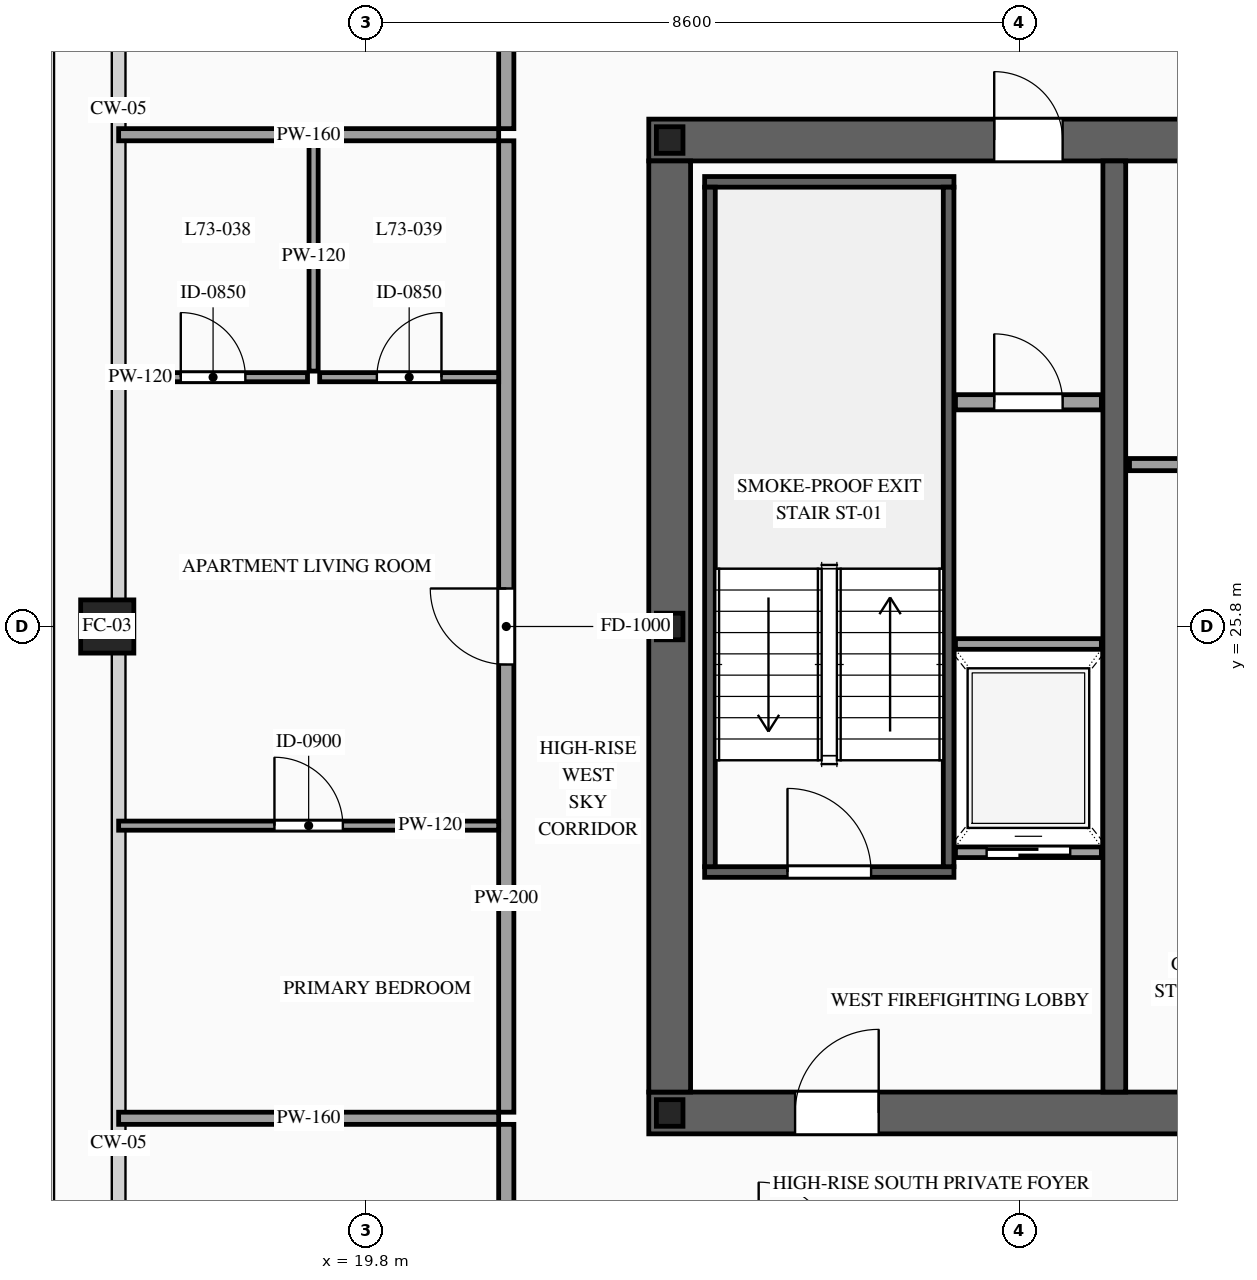
"""IFC4 building model, lengths in metres.
Left out: names, types, materials, properties, quantities, classifications, styles, units other than length and angle.
Written with IfcOpenShell. Run it as: python <this file> out.ifc"""

import sys

from ifc_helpers import new_model, si_unit, direction, frame, frame_2d, origin, origin_2d, place, context, subcontext, project, spatial, rectangle, hollow_rectangle, i_section, extrude, source, transform, mapped, element, fill, save


model = new_model("IFC4")
c1 = context("Model", 3, precision=1e-05, world=origin(), true_north=direction((0.0, 1.0)))
c2 = subcontext(c1, "Body", "Model", "MODEL_VIEW")
j1 = project(units=[si_unit("LENGTHUNIT", "METRE"), si_unit("PLANEANGLEUNIT", "RADIAN")], contexts=[c1])
p1 = place(None, origin())
s1 = spatial("IfcSite", under=j1, at=p1, CompositionType="ELEMENT")
p2 = place(p1, origin())
s2 = spatial("IfcBuilding", under=s1, at=p2, CompositionType="ELEMENT")
p3 = place(p2, frame((0.0, 0.0, 275.1)))
s3 = spatial("IfcBuildingStorey", under=s2, at=p3, CompositionType="ELEMENT", Elevation=275.1)
p4 = place(p3, frame((23.525, 19.4, 0.0), z_axis=(0.0, 0.0, 1.0), x_axis=(1.0, 0.0, 0.0)))
e1 = element("IfcWall", 1, at=p4, inside=s3, PredefinedType="SHEAR", context=c2, shape_type="SweptSolid", body=[
    extrude(rectangle(XDim=26.95, YDim=0.55, at=frame_2d((13.475, 0.0))), origin(), (0.0, 0.0, 1.0), 3.5),
])
p5 = place(p4, frame((1.925, 0.0, 0.0)))
e2 = element("IfcOpeningElement", 2, at=p5, cuts=e1, PredefinedType="OPENING", context=c2, shape_type="SweptSolid", body=[
    extrude(rectangle(XDim=1.1, YDim=2.2, at=frame_2d((0.55, 1.1))), frame((0.0, 0.29, 0.0), z_axis=(0.0, -1.0, 0.0), x_axis=(1.0, 0.0, 0.0)), (0.0, 0.0, 1.0), 0.58),
])
p6 = place(p4, frame((9.825, 0.0, 0.0)))
e3 = element("IfcOpeningElement", 3, at=p6, cuts=e1, PredefinedType="OPENING", context=c2, shape_type="SweptSolid", body=[
    extrude(rectangle(XDim=1.1, YDim=2.2, at=frame_2d((0.55, 1.1))), frame((0.0, 0.29, 0.0), z_axis=(0.0, -1.0, 0.0), x_axis=(1.0, 0.0, 0.0)), (0.0, 0.0, 1.0), 0.58),
])
p7 = place(p4, frame((23.025, 0.0, 0.0)))
e4 = element("IfcOpeningElement", 4, at=p7, cuts=e1, PredefinedType="OPENING", context=c2, shape_type="SweptSolid", body=[
    extrude(rectangle(XDim=1.1, YDim=2.2, at=frame_2d((0.55, 1.1))), frame((0.0, 0.29, 0.0), z_axis=(0.0, -1.0, 0.0), x_axis=(1.0, 0.0, 0.0)), (0.0, 0.0, 1.0), 0.58),
])
p8 = place(p4, frame((19.645, 0.0, 0.0)))
e5 = element("IfcOpeningElement", 5, at=p8, cuts=e1, PredefinedType="OPENING", context=c2, shape_type="SweptSolid", body=[
    extrude(rectangle(XDim=0.9, YDim=2.15, at=frame_2d((0.45, 1.075))), frame((0.0, 0.29, 0.0), z_axis=(0.0, -1.0, 0.0), x_axis=(1.0, 0.0, 0.0)), (0.0, 0.0, 1.0), 0.58),
])
p9 = place(p4, frame((18.205, 0.0, 0.0)))
e6 = element("IfcOpeningElement", 6, at=p9, cuts=e1, PredefinedType="OPENING", context=c2, shape_type="SweptSolid", body=[
    extrude(rectangle(XDim=0.9, YDim=2.15, at=frame_2d((0.45, 1.075))), frame((0.0, 0.29, 0.0), z_axis=(0.0, -1.0, 0.0), x_axis=(1.0, 0.0, 0.0)), (0.0, 0.0, 1.0), 0.58),
])
p10 = place(p3, frame((23.525, 32.2, 0.0), z_axis=(0.0, 0.0, 1.0), x_axis=(1.0, 0.0, 0.0)))
e7 = element("IfcWall", 7, at=p10, inside=s3, PredefinedType="SHEAR", context=c2, shape_type="SweptSolid", body=[
    extrude(rectangle(XDim=26.95, YDim=0.55, at=frame_2d((13.475, 0.0))), origin(), (0.0, 0.0, 1.0), 3.5),
])
p11 = place(p10, frame((4.545, 0.0, 0.0)))
e8 = element("IfcOpeningElement", 8, at=p11, cuts=e7, PredefinedType="OPENING", context=c2, shape_type="SweptSolid", body=[
    extrude(rectangle(XDim=0.9, YDim=2.15, at=frame_2d((0.45, 1.075))), frame((0.0, 0.29, 0.0), z_axis=(0.0, -1.0, 0.0), x_axis=(1.0, 0.0, 0.0)), (0.0, 0.0, 1.0), 0.58),
])
p12 = place(p10, frame((9.825, 0.0, 0.0)))
e9 = element("IfcOpeningElement", 9, at=p12, cuts=e7, PredefinedType="OPENING", context=c2, shape_type="SweptSolid", body=[
    extrude(rectangle(XDim=1.1, YDim=2.2, at=frame_2d((0.55, 1.1))), frame((0.0, 0.29, 0.0), z_axis=(0.0, -1.0, 0.0), x_axis=(1.0, 0.0, 0.0)), (0.0, 0.0, 1.0), 0.58),
])
p13 = place(p10, frame((15.675, 0.0, 0.0)))
e10 = element("IfcOpeningElement", 10, at=p13, cuts=e7, PredefinedType="OPENING", context=c2, shape_type="SweptSolid", body=[
    extrude(rectangle(XDim=1.1, YDim=2.2, at=frame_2d((0.55, 1.1))), frame((0.0, 0.29, 0.0), z_axis=(0.0, -1.0, 0.0), x_axis=(1.0, 0.0, 0.0)), (0.0, 0.0, 1.0), 0.58),
])
p14 = place(p10, frame((18.775, 0.0, 0.0)))
e11 = element("IfcOpeningElement", 11, at=p14, cuts=e7, PredefinedType="OPENING", context=c2, shape_type="SweptSolid", body=[
    extrude(rectangle(XDim=1.1, YDim=2.2, at=frame_2d((0.55, 1.1))), frame((0.0, 0.29, 0.0), z_axis=(0.0, -1.0, 0.0), x_axis=(1.0, 0.0, 0.0)), (0.0, 0.0, 1.0), 0.58),
])
m1 = source(origin(), c2, "Body", "SweptSolid", [
    extrude(rectangle(XDim=12.25, YDim=0.55, at=frame_2d((6.125, 0.0))), origin(), (0.0, 0.0, 1.0), 3.5),
])
p15 = place(p3, frame((23.8, 19.675, 0.0), z_axis=(0.0, 0.0, 1.0), x_axis=(0.0, 1.0, 0.0)))
e12 = element("IfcWall", 12, at=p15, inside=s3, PredefinedType="SHEAR", context=c2, shape_type="MappedRepresentation", body=[
    mapped(m1, transform((0.0, 0.0, 0.0), scale=1.0)),
])
m2 = source(origin(), c2, "Body", "SweptSolid", [
    extrude(rectangle(XDim=12.25, YDim=0.3, at=frame_2d((6.125, 0.0))), origin(), (0.0, 0.0, 1.0), 3.5),
])
p16 = place(p3, frame((29.65, 19.675, 0.0), z_axis=(0.0, 0.0, 1.0), x_axis=(0.0, 1.0, 0.0)))
e13 = element("IfcWall", 13, at=p16, inside=s3, PredefinedType="SOLIDWALL", context=c2, shape_type="MappedRepresentation", body=[
    mapped(m2, transform((0.0, 0.0, 0.0), scale=1.0)),
])
m3 = source(origin(), c2, "Body", "SweptSolid", [
    extrude(i_section(OverallWidth=0.35, OverallDepth=0.35, WebThickness=0.012, FlangeThickness=0.019, at=origin_2d()), origin(), (0.0, 0.0, 1.0), 3.5),
])
for number, where, z_axis, x_axis in (
    (14, (23.8, 19.4, 0.0), (0.0, 0.0, 1.0), (1.0, 0.0, 0.0)),
    (15, (23.8, 25.8, 0.0), (0.0, 0.0, 1.0), (1.0, 0.0, 0.0)),
    (16, (23.8, 32.2, 0.0), (0.0, 0.0, 1.0), (1.0, 0.0, 0.0)),
):
    element("IfcColumn", number, at=place(p3, frame(where, z_axis=z_axis, x_axis=x_axis)), inside=s3, PredefinedType="COLUMN", context=c2, shape_type="MappedRepresentation", body=[
        mapped(m3, transform((0.0, 0.0, 0.0), scale=1.0)),
    ])
m4 = source(origin(), c2, "Body", "SweptSolid", [
    extrude(hollow_rectangle(XDim=0.7, YDim=0.7, WallThickness=0.032, at=origin_2d()), origin(), (0.0, 0.0, 1.0), 3.5),
])
p17 = place(p3, frame((16.4, 25.8, 0.0), z_axis=(0.0, 0.0, 1.0), x_axis=(1.0, 0.0, 0.0)))
e17 = element("IfcColumn", 17, at=p17, inside=s3, PredefinedType="COLUMN", context=c2, shape_type="MappedRepresentation", body=[
    mapped(m4, transform((0.0, 0.0, 0.0), scale=1.0)),
])
p18 = place(p3, frame((27.56, 22.83, 0.0), z_axis=(0.0, 0.0, 1.0), x_axis=(1.0, 0.0, 0.0)))
e18 = element("IfcWall", 18, at=p18, inside=s3, PredefinedType="SOLIDWALL", context=c2, shape_type="SweptSolid", body=[
    extrude(rectangle(XDim=1.92, YDim=0.14, at=frame_2d((0.96, 0.0))), origin(), (0.0, 0.0, 1.0), 3.28),
])
p19 = place(p18, frame((0.41, 0.0, 0.0)))
e19 = element("IfcOpeningElement", 19, at=p19, cuts=e18, PredefinedType="OPENING", context=c2, shape_type="SweptSolid", body=[
    extrude(rectangle(XDim=1.1, YDim=2.2, at=frame_2d((0.55, 1.1))), frame((0.0, 0.085, 0.0), z_axis=(0.0, -1.0, 0.0), x_axis=(1.0, 0.0, 0.0)), (0.0, 0.0, 1.0), 0.17),
])
m5 = source(origin(), c2, "Body", "SweptSolid", [
    extrude(rectangle(XDim=1.92, YDim=0.14, at=frame_2d((0.96, 0.0))), origin(), (0.0, 0.0, 1.0), 3.28),
])
p20 = place(p3, frame((27.56, 25.57, 0.0), z_axis=(0.0, 0.0, 1.0), x_axis=(1.0, 0.0, 0.0)))
e20 = element("IfcWall", 20, at=p20, inside=s3, PredefinedType="SOLIDWALL", context=c2, shape_type="MappedRepresentation", body=[
    mapped(m5, transform((0.0, 0.0, 0.0), scale=1.0)),
])
p21 = place(p3, frame((24.26, 22.57, 0.0), z_axis=(0.0, 0.0, 1.0), x_axis=(1.0, 0.0, 0.0)))
e21 = element("IfcWall", 21, at=p21, inside=s3, PredefinedType="SOLIDWALL", context=c2, shape_type="SweptSolid", body=[
    extrude(rectangle(XDim=3.28, YDim=0.14, at=frame_2d((1.64, 0.0))), origin(), (0.0, 0.0, 1.0), 3.28),
])
p22 = place(p21, frame((1.09, 0.0, 0.0)))
e22 = element("IfcOpeningElement", 22, at=p22, cuts=e21, PredefinedType="OPENING", context=c2, shape_type="SweptSolid", body=[
    extrude(rectangle(XDim=1.1, YDim=2.2, at=frame_2d((0.55, 1.1))), frame((0.0, 0.085, 0.0), z_axis=(0.0, -1.0, 0.0), x_axis=(1.0, 0.0, 0.0)), (0.0, 0.0, 1.0), 0.17),
])
m6 = source(origin(), c2, "Body", "SweptSolid", [
    extrude(rectangle(XDim=3.28, YDim=0.14, at=frame_2d((1.64, 0.0))), origin(), (0.0, 0.0, 1.0), 3.28),
])
p23 = place(p3, frame((24.26, 31.65, 0.0), z_axis=(0.0, 0.0, 1.0), x_axis=(1.0, 0.0, 0.0)))
e23 = element("IfcWall", 23, at=p23, inside=s3, PredefinedType="SOLIDWALL", context=c2, shape_type="MappedRepresentation", body=[
    mapped(m6, transform((0.0, 0.0, 0.0), scale=1.0)),
])
m7 = source(origin(), c2, "Body", "SweptSolid", [
    extrude(rectangle(XDim=8.94, YDim=0.14, at=frame_2d((4.47, 0.0))), origin(), (0.0, 0.0, 1.0), 3.28),
])
for number, where, z_axis, x_axis in (
    (24, (24.33, 22.64, 0.0), (0.0, 0.0, 1.0), (0.0, 1.0, 0.0)),
    (25, (27.47, 22.64, 0.0), (0.0, 0.0, 1.0), (0.0, 1.0, 0.0)),
):
    element("IfcWall", number, at=place(p3, frame(where, z_axis=z_axis, x_axis=x_axis)), inside=s3, PredefinedType="SOLIDWALL", context=c2, shape_type="MappedRepresentation", body=[
        mapped(m7, transform((0.0, 0.0, 0.0), scale=1.0)),
    ])
p24 = place(p3, frame((27.56, 28.75, 0.0), z_axis=(0.0, 0.0, 1.0), x_axis=(1.0, 0.0, 0.0)))
e26 = element("IfcWall", 26, at=p24, inside=s3, PredefinedType="PARTITIONING", context=c2, shape_type="SweptSolid", body=[
    extrude(rectangle(XDim=1.92, YDim=0.2, at=frame_2d((0.96, 0.0))), origin(), (0.0, 0.0, 1.0), 3.28),
])
p25 = place(p24, frame((0.51, 0.0, 0.0)))
e27 = element("IfcOpeningElement", 27, at=p25, cuts=e26, PredefinedType="OPENING", context=c2, shape_type="SweptSolid", body=[
    extrude(rectangle(XDim=0.9, YDim=2.15, at=frame_2d((0.45, 1.075))), frame((0.0, 0.115, 0.0), z_axis=(0.0, -1.0, 0.0), x_axis=(1.0, 0.0, 0.0)), (0.0, 0.0, 1.0), 0.23),
])
m8 = source(origin(), c2, "Body", "SweptSolid", [
    extrude(rectangle(XDim=2.47, YDim=0.16, at=frame_2d((1.235, 0.0))), origin(), (0.0, 0.0, 1.0), 3.28),
])
p26 = place(p3, frame((29.85, 27.93, 0.0), z_axis=(0.0, 0.0, 1.0), x_axis=(1.0, 0.0, 0.0)))
e28 = element("IfcWall", 28, at=p26, inside=s3, PredefinedType="PARTITIONING", context=c2, shape_type="MappedRepresentation", body=[
    mapped(m8, transform((0.0, 0.0, 0.0), scale=1.0)),
])
m9 = source(origin(), c2, "Body", "SweptSolid", [
    extrude(rectangle(XDim=1.7, YDim=0.2, at=frame_2d((0.85, 0.0))), origin(), (0.0, 0.0, 1.0), 3.28),
])
for number, where, z_axis, x_axis in (
    (29, (21.65, 32.35, 0.0), (0.0, 0.0, 1.0), (0.0, 1.0, 0.0)),
    (30, (21.65, 17.55, 0.0), (0.0, 0.0, 1.0), (0.0, 1.0, 0.0)),
):
    element("IfcWall", number, at=place(p3, frame(where, z_axis=z_axis, x_axis=x_axis)), inside=s3, PredefinedType="PARTITIONING", context=c2, shape_type="MappedRepresentation", body=[
        mapped(m9, transform((0.0, 0.0, 0.0), scale=1.0)),
    ])
p27 = place(p3, frame((21.65, 19.41, 0.0), z_axis=(0.0, 0.0, 1.0), x_axis=(0.0, 1.0, 0.0)))
e31 = element("IfcWall", 31, at=p27, inside=s3, PredefinedType="PARTITIONING", context=c2, shape_type="SweptSolid", body=[
    extrude(rectangle(XDim=12.78, YDim=0.2, at=frame_2d((6.39, 0.0))), origin(), (0.0, 0.0, 1.0), 3.28),
])
p28 = place(p27, frame((5.89, 0.0, 0.0)))
e32 = element("IfcOpeningElement", 32, at=p28, cuts=e31, PredefinedType="OPENING", context=c2, shape_type="SweptSolid", body=[
    extrude(rectangle(XDim=1.0, YDim=2.2, at=frame_2d((0.5, 1.1))), frame((0.0, 0.115, 0.0), z_axis=(0.0, -1.0, 0.0), x_axis=(1.0, 0.0, 0.0)), (0.0, 0.0, 1.0), 0.23),
])
m10 = source(origin(), c2, "Body", "SweptSolid", [
    extrude(rectangle(XDim=5.0, YDim=0.16, at=frame_2d((2.5, 0.0))), origin(), (0.0, 0.0, 1.0), 2.825),
])
for number, where, z_axis, x_axis in (
    (33, (16.55, 19.33, 0.0), (0.0, 0.0, 1.0), (1.0, 0.0, 0.0)),
    (34, (16.55, 32.27, 0.0), (0.0, 0.0, 1.0), (1.0, 0.0, 0.0)),
):
    element("IfcWall", number, at=place(p3, frame(where, z_axis=z_axis, x_axis=x_axis)), inside=s3, PredefinedType="PARTITIONING", context=c2, shape_type="MappedRepresentation", body=[
        mapped(m10, transform((0.0, 0.0, 0.0), scale=1.0)),
    ])
p29 = place(p3, frame((16.55, 29.08, 0.0), z_axis=(0.0, 0.0, 1.0), x_axis=(1.0, 0.0, 0.0)))
e35 = element("IfcWall", 35, at=p29, inside=s3, PredefinedType="PARTITIONING", context=c2, shape_type="SweptSolid", body=[
    extrude(rectangle(XDim=2.485, YDim=0.12, at=frame_2d((1.242, 0.0))), origin(), (0.0, 0.0, 1.0), 3.28),
])
p30 = place(p29, frame((0.817, 0.0, 0.0)))
e36 = element("IfcOpeningElement", 36, at=p30, cuts=e35, PredefinedType="OPENING", context=c2, shape_type="SweptSolid", body=[
    extrude(rectangle(XDim=0.85, YDim=2.1, at=frame_2d((0.425, 1.05))), frame((0.0, 0.075, 0.0), z_axis=(0.0, -1.0, 0.0), x_axis=(1.0, 0.0, 0.0)), (0.0, 0.0, 1.0), 0.15),
])
m11 = source(origin(), c2, "Body", "SweptSolid", [
    extrude(rectangle(XDim=3.03, YDim=0.12, at=frame_2d((1.515, 0.0))), origin(), (0.0, 0.0, 1.0), 3.28),
])
p31 = place(p3, frame((19.115, 29.16, 0.0), z_axis=(0.0, 0.0, 1.0), x_axis=(0.0, 1.0, 0.0)))
e37 = element("IfcWall", 37, at=p31, inside=s3, PredefinedType="PARTITIONING", context=c2, shape_type="MappedRepresentation", body=[
    mapped(m11, transform((0.0, 0.0, 0.0), scale=1.0)),
])
p32 = place(p3, frame((19.195, 29.08, 0.0), z_axis=(0.0, 0.0, 1.0), x_axis=(1.0, 0.0, 0.0)))
e38 = element("IfcWall", 38, at=p32, inside=s3, PredefinedType="PARTITIONING", context=c2, shape_type="SweptSolid", body=[
    extrude(rectangle(XDim=2.355, YDim=0.12, at=frame_2d((1.177, 0.0))), origin(), (0.0, 0.0, 1.0), 3.28),
])
p33 = place(p32, frame((0.752, 0.0, 0.0)))
e39 = element("IfcOpeningElement", 39, at=p33, cuts=e38, PredefinedType="OPENING", context=c2, shape_type="SweptSolid", body=[
    extrude(rectangle(XDim=0.85, YDim=2.1, at=frame_2d((0.425, 1.05))), frame((0.0, 0.075, 0.0), z_axis=(0.0, -1.0, 0.0), x_axis=(1.0, 0.0, 0.0)), (0.0, 0.0, 1.0), 0.15),
])
p34 = place(p3, frame((16.55, 23.18, 0.0), z_axis=(0.0, 0.0, 1.0), x_axis=(1.0, 0.0, 0.0)))
e40 = element("IfcWall", 40, at=p34, inside=s3, PredefinedType="PARTITIONING", context=c2, shape_type="SweptSolid", body=[
    extrude(rectangle(XDim=5.0, YDim=0.12, at=frame_2d((2.5, 0.0))), origin(), (0.0, 0.0, 1.0), 3.28),
])
p35 = place(p34, frame((2.05, 0.0, 0.0)))
e41 = element("IfcOpeningElement", 41, at=p35, cuts=e40, PredefinedType="OPENING", context=c2, shape_type="SweptSolid", body=[
    extrude(rectangle(XDim=0.9, YDim=2.15, at=frame_2d((0.45, 1.075))), frame((0.0, 0.075, 0.0), z_axis=(0.0, -1.0, 0.0), x_axis=(1.0, 0.0, 0.0)), (0.0, 0.0, 1.0), 0.15),
])
m12 = source(origin(), c2, "Body", "SweptSolid", [
    extrude(rectangle(XDim=1.1, YDim=2.2, at=frame_2d((0.55, 1.1))), frame((0.0, 0.025, 0.0), z_axis=(0.0, -1.0, 0.0), x_axis=(1.0, 0.0, 0.0)), (0.0, 0.0, 1.0), 0.05),
])
p36 = place(p19, origin())
e42 = element("IfcDoor", 42, at=p36, inside=s3, OperationType="SLIDING_TO_LEFT", PredefinedType="DOOR", context=c2, shape_type="MappedRepresentation", body=[
    mapped(m12, transform((0.0, 0.0, 0.0), scale=1.0)),
])
fill(e19, e42)
m13 = source(origin(), c2, "Body", "SweptSolid", [
    extrude(rectangle(XDim=1.1, YDim=2.2, at=frame_2d((0.55, 1.1))), frame((0.0, 0.025, 0.0), z_axis=(0.0, -1.0, 0.0), x_axis=(1.0, 0.0, 0.0)), (0.0, 0.0, 1.0), 0.05),
])
p37 = place(p22, origin())
e43 = element("IfcDoor", 43, at=p37, inside=s3, OperationType="SINGLE_SWING_LEFT", PredefinedType="DOOR", context=c2, shape_type="MappedRepresentation", body=[
    mapped(m13, transform((0.0, 0.0, 0.0), scale=1.0)),
])
fill(e22, e43)
p38 = place(p5, origin())
e44 = element("IfcDoor", 44, at=p38, inside=s3, OperationType="SINGLE_SWING_RIGHT", PredefinedType="DOOR", context=c2, shape_type="MappedRepresentation", body=[
    mapped(m13, transform((0.0, 0.0, 0.0), scale=1.0)),
])
fill(e2, e44)
m14 = source(origin(), c2, "Body", "SweptSolid", [
    extrude(rectangle(XDim=0.9, YDim=2.15, at=frame_2d((0.45, 1.075))), frame((0.0, 0.025, 0.0), z_axis=(0.0, -1.0, 0.0), x_axis=(1.0, 0.0, 0.0)), (0.0, 0.0, 1.0), 0.05),
])
p39 = place(p11, origin())
e45 = element("IfcDoor", 45, at=p39, inside=s3, OperationType="SINGLE_SWING_LEFT", PredefinedType="DOOR", context=c2, shape_type="MappedRepresentation", body=[
    mapped(m14, transform((0.0, 0.0, 0.0), scale=1.0)),
])
fill(e8, e45)
p40 = place(p25, origin())
e46 = element("IfcDoor", 46, at=p40, inside=s3, OperationType="SINGLE_SWING_LEFT", PredefinedType="DOOR", context=c2, shape_type="MappedRepresentation", body=[
    mapped(m14, transform((0.0, 0.0, 0.0), scale=1.0)),
])
fill(e27, e46)
m15 = source(origin(), c2, "Body", "SweptSolid", [
    extrude(rectangle(XDim=1.0, YDim=2.2, at=frame_2d((0.5, 1.1))), frame((0.0, 0.025, 0.0), z_axis=(0.0, -1.0, 0.0), x_axis=(1.0, 0.0, 0.0)), (0.0, 0.0, 1.0), 0.05),
])
p41 = place(p28, origin())
e47 = element("IfcDoor", 47, at=p41, inside=s3, OperationType="SINGLE_SWING_RIGHT", PredefinedType="DOOR", context=c2, shape_type="MappedRepresentation", body=[
    mapped(m15, transform((0.0, 0.0, 0.0), scale=1.0)),
])
fill(e32, e47)
m16 = source(origin(), c2, "Body", "SweptSolid", [
    extrude(rectangle(XDim=0.85, YDim=2.1, at=frame_2d((0.425, 1.05))), frame((0.0, 0.025, 0.0), z_axis=(0.0, -1.0, 0.0), x_axis=(1.0, 0.0, 0.0)), (0.0, 0.0, 1.0), 0.05),
])
p42 = place(p30, origin())
e48 = element("IfcDoor", 48, at=p42, inside=s3, OperationType="SINGLE_SWING_LEFT", PredefinedType="DOOR", context=c2, shape_type="MappedRepresentation", body=[
    mapped(m16, transform((0.0, 0.0, 0.0), scale=1.0)),
])
fill(e36, e48)
p43 = place(p33, origin())
e49 = element("IfcDoor", 49, at=p43, inside=s3, OperationType="SINGLE_SWING_RIGHT", PredefinedType="DOOR", context=c2, shape_type="MappedRepresentation", body=[
    mapped(m16, transform((0.0, 0.0, 0.0), scale=1.0)),
])
fill(e39, e49)
m17 = source(origin(), c2, "Body", "SweptSolid", [
    extrude(rectangle(XDim=0.9, YDim=2.15, at=frame_2d((0.45, 1.075))), frame((0.0, 0.025, 0.0), z_axis=(0.0, -1.0, 0.0), x_axis=(1.0, 0.0, 0.0)), (0.0, 0.0, 1.0), 0.05),
])
p44 = place(p35, origin())
e50 = element("IfcDoor", 50, at=p44, inside=s3, OperationType="SINGLE_SWING_LEFT", PredefinedType="DOOR", context=c2, shape_type="MappedRepresentation", body=[
    mapped(m17, transform((0.0, 0.0, 0.0), scale=1.0)),
])
fill(e41, e50)
save(model, sys.argv[1])
